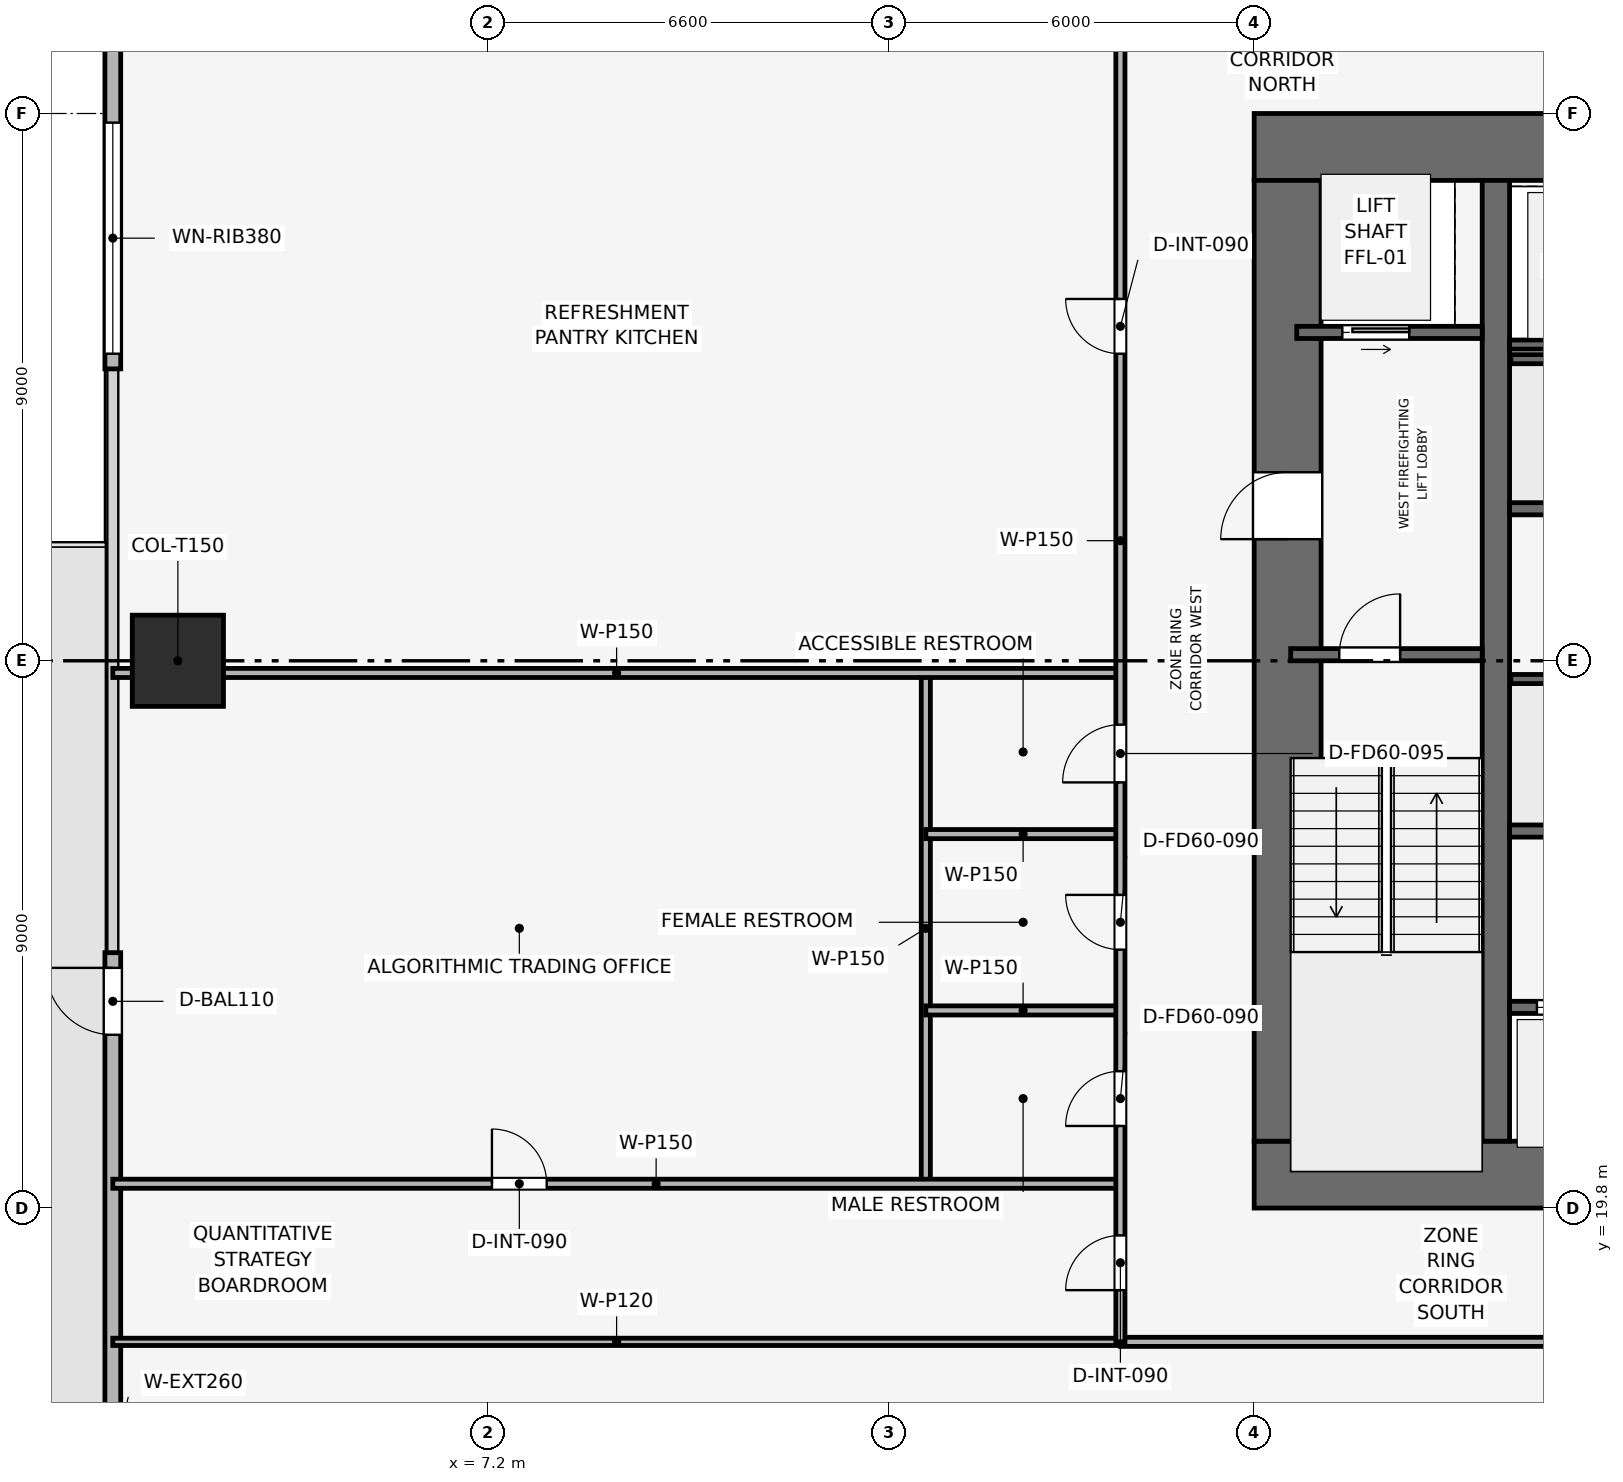
"""IFC4 building model, lengths in metres.
Left out: names, types, materials, properties, quantities, classifications, styles, units other than length and angle.
Written with IfcOpenShell. Run it as: python <this file> out.ifc"""

import sys

from ifc_helpers import new_model, si_unit, direction, frame, frame_2d, origin, origin_2d, place, context, subcontext, project, spatial, rectangle, extrude, element, fill, save


model = new_model("IFC4")
c1 = context("Model", 3, precision=1e-05, world=origin(), true_north=direction((0.0, 1.0)))
c2 = subcontext(c1, "Body", "Model", "MODEL_VIEW")
j1 = project(units=[si_unit("LENGTHUNIT", "METRE"), si_unit("PLANEANGLEUNIT", "RADIAN")], contexts=[c1])
p1 = place(None, origin())
s1 = spatial("IfcSite", under=j1, at=p1, CompositionType="ELEMENT")
p2 = place(p1, origin())
s2 = spatial("IfcBuilding", under=s1, at=p2, CompositionType="ELEMENT")
p3 = place(p2, frame((0.0, 0.0, 84.6)))
s3 = spatial("IfcBuildingStorey", under=s2, at=p3, CompositionType="ELEMENT", Elevation=84.6)
p4 = place(p3, frame((19.8, 20.35, 0.0), z_axis=(0.0, 0.0, 1.0), x_axis=(1.0, 0.0, 0.0)))
e1 = element("IfcWall", 1, at=p4, inside=s3, PredefinedType="SHEAR", context=c2, shape_type="SweptSolid", body=[
    extrude(rectangle(XDim=18.0, YDim=1.1, at=frame_2d((9.0, 0.0))), origin(), (0.0, 0.0, 1.0), 3.9),
])
p5 = place(p4, frame((8.4, 0.0, 0.0)))
e2 = element("IfcOpeningElement", 2, at=p5, cuts=e1, PredefinedType="OPENING", context=c2, shape_type="SweptSolid", body=[
    extrude(rectangle(XDim=1.2, YDim=2.2, at=frame_2d((0.6, 1.1))), frame((0.0, 0.56, 0.0), z_axis=(0.0, -1.0, 0.0), x_axis=(1.0, 0.0, 0.0)), (0.0, 0.0, 1.0), 1.12),
])
p6 = place(p3, frame((19.8, 37.25, 0.0), z_axis=(0.0, 0.0, 1.0), x_axis=(1.0, 0.0, 0.0)))
e3 = element("IfcWall", 3, at=p6, inside=s3, PredefinedType="SHEAR", context=c2, shape_type="SweptSolid", body=[
    extrude(rectangle(XDim=18.0, YDim=1.1, at=frame_2d((9.0, 0.0))), origin(), (0.0, 0.0, 1.0), 3.9),
])
p7 = place(p6, frame((7.05, 0.0, 0.0)))
e4 = element("IfcOpeningElement", 4, at=p7, cuts=e3, PredefinedType="OPENING", context=c2, shape_type="SweptSolid", body=[
    extrude(rectangle(XDim=1.1, YDim=2.15, at=frame_2d((0.55, 1.075))), frame((0.0, 0.56, 0.0), z_axis=(0.0, -1.0, 0.0), x_axis=(1.0, 0.0, 0.0)), (0.0, 0.0, 1.0), 1.12),
])
p8 = place(p3, frame((20.35, 20.9, 0.0), z_axis=(0.0, 0.0, 1.0), x_axis=(0.0, 1.0, 0.0)))
e5 = element("IfcWall", 5, at=p8, inside=s3, PredefinedType="SHEAR", context=c2, shape_type="SweptSolid", body=[
    extrude(rectangle(XDim=15.8, YDim=1.1, at=frame_2d((7.9, 0.0))), origin(), (0.0, 0.0, 1.0), 3.9),
])
p9 = place(p8, frame((9.9, 0.0, 0.0)))
e6 = element("IfcOpeningElement", 6, at=p9, cuts=e5, PredefinedType="OPENING", context=c2, shape_type="SweptSolid", body=[
    extrude(rectangle(XDim=1.1, YDim=2.15, at=frame_2d((0.55, 1.075))), frame((0.0, 0.56, 0.0), z_axis=(0.0, -1.0, 0.0), x_axis=(1.0, 0.0, 0.0)), (0.0, 0.0, 1.0), 1.12),
])
p10 = place(p3, frame((23.775, 20.9, 0.0), z_axis=(0.0, 0.0, 1.0), x_axis=(0.0, 1.0, 0.0)))
e7 = element("IfcWall", 7, at=p10, inside=s3, PredefinedType="SHEAR", context=c2, shape_type="SweptSolid", body=[
    extrude(rectangle(XDim=15.8, YDim=0.45, at=frame_2d((7.9, 0.0))), origin(), (0.0, 0.0, 1.0), 3.9),
])
p11 = place(p3, frame((2.1, 28.8, 0.003), z_axis=(0.0, 0.0, 1.0), x_axis=(1.0, 0.0, 0.0)))
e8 = element("IfcColumn", 8, at=p11, inside=s3, PredefinedType="COLUMN", context=c2, shape_type="SweptSolid", body=[
    extrude(rectangle(XDim=1.5, YDim=1.5, at=origin_2d()), origin(), (0.0, 0.0, 1.0), 3.644),
])
p12 = place(p3, frame((1.03, 8.7, 0.0), z_axis=(0.0, 0.0, 1.0), x_axis=(0.0, 1.0, 0.0)))
e9 = element("IfcWall", 9, at=p12, inside=s3, PredefinedType="SOLIDWALL", context=c2, shape_type="SweptSolid", body=[
    extrude(rectangle(XDim=15.3, YDim=0.26, at=frame_2d((7.65, 0.0))), origin(), (0.0, 0.0, 1.0), 3.65),
])
p13 = place(p12, frame((13.95, 0.0, 0.0)))
e10 = element("IfcOpeningElement", 10, at=p13, cuts=e9, PredefinedType="OPENING", context=c2, shape_type="SweptSolid", body=[
    extrude(rectangle(XDim=1.1, YDim=2.2, at=frame_2d((0.55, 1.1))), frame((0.0, 0.14, 0.0), z_axis=(0.0, -1.0, 0.0), x_axis=(1.0, 0.0, 0.0)), (0.0, 0.0, 1.0), 0.28),
])
p14 = place(p3, frame((1.03, 33.6, 0.0), z_axis=(0.0, 0.0, 1.0), x_axis=(0.0, 1.0, 0.0)))
e11 = element("IfcWall", 11, at=p14, inside=s3, PredefinedType="SOLIDWALL", context=c2, shape_type="SweptSolid", body=[
    extrude(rectangle(XDim=15.3, YDim=0.26, at=frame_2d((7.65, 0.0))), origin(), (0.0, 0.0, 1.0), 3.65),
])
p15 = place(p14, frame((0.25, 0.0, 0.9)))
e12 = element("IfcOpeningElement", 12, at=p15, cuts=e11, PredefinedType="OPENING", context=c2, shape_type="SweptSolid", body=[
    extrude(rectangle(XDim=3.8, YDim=1.9, at=frame_2d((1.9, 0.95))), frame((0.0, 0.14, 0.0), z_axis=(0.0, -1.0, 0.0), x_axis=(1.0, 0.0, 0.0)), (0.0, 0.0, 1.0), 0.28),
])
p16 = place(p3, frame((20.4, 28.9, 0.0), z_axis=(0.0, 0.0, 1.0), x_axis=(1.0, 0.0, 0.0)))
e13 = element("IfcWall", 13, at=p16, inside=s3, PredefinedType="SHEAR", context=c2, shape_type="SweptSolid", body=[
    extrude(rectangle(XDim=3.15, YDim=0.2, at=frame_2d((1.575, 0.0))), origin(), (0.0, 0.0, 1.0), 3.65),
])
p17 = place(p16, frame((0.8, 0.0, 0.0)))
e14 = element("IfcOpeningElement", 14, at=p17, cuts=e13, PredefinedType="OPENING", context=c2, shape_type="SweptSolid", body=[
    extrude(rectangle(XDim=1.0, YDim=2.1, at=frame_2d((0.5, 1.05))), frame((0.0, 0.11, 0.0), z_axis=(0.0, -1.0, 0.0), x_axis=(1.0, 0.0, 0.0)), (0.0, 0.0, 1.0), 0.22),
])
p18 = place(p3, frame((20.5, 34.2, 0.0), z_axis=(0.0, 0.0, 1.0), x_axis=(1.0, 0.0, 0.0)))
e15 = element("IfcWall", 15, at=p18, inside=s3, PredefinedType="SHEAR", context=c2, shape_type="SweptSolid", body=[
    extrude(rectangle(XDim=3.05, YDim=0.2, at=frame_2d((1.525, 0.0))), origin(), (0.0, 0.0, 1.0), 3.65),
])
p19 = place(p18, frame((0.75, 0.0, 0.0)))
e16 = element("IfcOpeningElement", 16, at=p19, cuts=e15, PredefinedType="OPENING", context=c2, shape_type="SweptSolid", body=[
    extrude(rectangle(XDim=1.1, YDim=2.15, at=frame_2d((0.55, 1.075))), frame((0.0, 0.11, 0.0), z_axis=(0.0, -1.0, 0.0), x_axis=(1.0, 0.0, 0.0)), (0.0, 0.0, 1.0), 0.22),
])
p20 = place(p3, frame((24.0, 34.0, 0.0), z_axis=(0.0, 0.0, 1.0), x_axis=(1.0, 0.0, 0.0)))
e17 = element("IfcWall", 17, at=p20, inside=s3, PredefinedType="SHEAR", context=c2, shape_type="SweptSolid", body=[
    extrude(rectangle(XDim=2.48, YDim=0.15, at=frame_2d((1.24, 0.0))), origin(), (0.0, 0.0, 1.0), 3.65),
])
p21 = place(p3, frame((24.0, 23.1, 0.0), z_axis=(0.0, 0.0, 1.0), x_axis=(1.0, 0.0, 0.0)))
e18 = element("IfcWall", 18, at=p21, inside=s3, PredefinedType="SHEAR", context=c2, shape_type="SweptSolid", body=[
    extrude(rectangle(XDim=2.0, YDim=0.2, at=frame_2d((1.0, 0.0))), origin(), (0.0, 0.0, 1.0), 3.65),
])
p22 = place(p21, frame((0.45, 0.0, 0.0)))
e19 = element("IfcOpeningElement", 19, at=p22, cuts=e18, PredefinedType="OPENING", context=c2, shape_type="SweptSolid", body=[
    extrude(rectangle(XDim=1.1, YDim=2.15, at=frame_2d((0.55, 1.075))), frame((0.0, 0.11, 0.0), z_axis=(0.0, -1.0, 0.0), x_axis=(1.0, 0.0, 0.0)), (0.0, 0.0, 1.0), 0.22),
])
for number, where, z_axis, x_axis in (
    (20, (24.0, 26.0, 0.0), (0.0, 0.0, 1.0), (1.0, 0.0, 0.0)),
    (21, (24.0, 31.3, 0.0), (0.0, 0.0, 1.0), (1.0, 0.0, 0.0)),
):
    element("IfcWall", number, at=place(p3, frame(where, z_axis=z_axis, x_axis=x_axis)), inside=s3, PredefinedType="SHEAR", context=c2, shape_type="SweptSolid", body=[
        extrude(rectangle(XDim=2.0, YDim=0.2, at=frame_2d((1.0, 0.0))), origin(), (0.0, 0.0, 1.0), 3.65),
    ])
for number, where, z_axis, x_axis in (
    (22, (24.02, 28.5, 0.0), (0.0, 0.0, 1.0), (1.0, 0.0, 0.0)),
    (23, (24.02, 33.76, 0.0), (0.0, 0.0, 1.0), (1.0, 0.0, 0.0)),
):
    element("IfcWall", number, at=place(p3, frame(where, z_axis=z_axis, x_axis=x_axis)), inside=s3, PredefinedType="SHEAR", context=c2, shape_type="SweptSolid", body=[
        extrude(rectangle(XDim=4.08, YDim=0.15, at=frame_2d((2.04, 0.0))), origin(), (0.0, 0.0, 1.0), 3.65),
    ])
p23 = place(p3, frame((1.03, 17.6, 0.0), z_axis=(0.0, 0.0, 1.0), x_axis=(1.0, 0.0, 0.0)))
e24 = element("IfcWall", 24, at=p23, inside=s3, PredefinedType="PARTITIONING", context=c2, shape_type="SweptSolid", body=[
    extrude(rectangle(XDim=16.57, YDim=0.12, at=frame_2d((8.285, 0.0))), origin(), (0.0, 0.0, 1.0), 2.935),
])
p24 = place(p3, frame((14.4, 20.2, 0.0), z_axis=(0.0, 0.0, 1.0), x_axis=(0.0, 1.0, 0.0)))
e25 = element("IfcWall", 25, at=p24, inside=s3, PredefinedType="PARTITIONING", context=c2, shape_type="SweptSolid", body=[
    extrude(rectangle(XDim=8.4, YDim=0.15, at=frame_2d((4.2, 0.0))), origin(), (0.0, 0.0, 1.0), 3.085),
])
p25 = place(p3, frame((1.03, 20.2, 0.0), z_axis=(0.0, 0.0, 1.0), x_axis=(1.0, 0.0, 0.0)))
e26 = element("IfcWall", 26, at=p25, inside=s3, PredefinedType="PARTITIONING", context=c2, shape_type="SweptSolid", body=[
    extrude(rectangle(XDim=16.57, YDim=0.15, at=frame_2d((8.285, 0.0))), origin(), (0.0, 0.0, 1.0), 2.935),
])
p26 = place(p25, frame((6.235, 0.0, 0.0)))
e27 = element("IfcOpeningElement", 27, at=p26, cuts=e26, PredefinedType="OPENING", context=c2, shape_type="SweptSolid", body=[
    extrude(rectangle(XDim=0.9, YDim=2.1, at=frame_2d((0.45, 1.05))), frame((0.0, 0.085, 0.0), z_axis=(0.0, -1.0, 0.0), x_axis=(1.0, 0.0, 0.0)), (0.0, 0.0, 1.0), 0.17),
])
p27 = place(p3, frame((1.03, 28.6, 0.0), z_axis=(0.0, 0.0, 1.0), x_axis=(1.0, 0.0, 0.0)))
e28 = element("IfcWall", 28, at=p27, inside=s3, PredefinedType="PARTITIONING", context=c2, shape_type="SweptSolid", body=[
    extrude(rectangle(XDim=16.57, YDim=0.15, at=frame_2d((8.285, 0.0))), origin(), (0.0, 0.0, 1.0), 2.935),
])
for number, where, z_axis, x_axis in (
    (29, (14.4, 23.05, 0.0), (0.0, 0.0, 1.0), (1.0, 0.0, 0.0)),
    (30, (14.4, 25.95, 0.0), (0.0, 0.0, 1.0), (1.0, 0.0, 0.0)),
):
    element("IfcWall", number, at=place(p3, frame(where, z_axis=z_axis, x_axis=x_axis)), inside=s3, PredefinedType="PARTITIONING", context=c2, shape_type="SweptSolid", body=[
        extrude(rectangle(XDim=3.2, YDim=0.15, at=frame_2d((1.6, 0.0))), origin(), (0.0, 0.0, 1.0), 3.65),
    ])
p28 = place(p3, frame((17.6, 17.6, 0.0), z_axis=(0.0, 0.0, 1.0), x_axis=(1.0, 0.0, 0.0)))
e31 = element("IfcWall", 31, at=p28, inside=s3, PredefinedType="PARTITIONING", context=c2, shape_type="SweptSolid", body=[
    extrude(rectangle(XDim=22.4, YDim=0.15, at=frame_2d((11.2, 0.0))), origin(), (0.0, 0.0, 1.0), 3.085),
])
p29 = place(p28, frame((10.75, 0.0, 0.0)))
e32 = element("IfcOpeningElement", 32, at=p29, cuts=e31, PredefinedType="OPENING", context=c2, shape_type="SweptSolid", body=[
    extrude(rectangle(XDim=0.9, YDim=2.1, at=frame_2d((0.45, 1.05))), frame((0.0, 0.085, 0.0), z_axis=(0.0, -1.0, 0.0), x_axis=(1.0, 0.0, 0.0)), (0.0, 0.0, 1.0), 0.17),
])
p30 = place(p3, frame((17.6, 17.6, 0.0), z_axis=(0.0, 0.0, 1.0), x_axis=(0.0, 1.0, 0.0)))
e33 = element("IfcWall", 33, at=p30, inside=s3, PredefinedType="PARTITIONING", context=c2, shape_type="SweptSolid", body=[
    extrude(rectangle(XDim=22.4, YDim=0.15, at=frame_2d((11.2, 0.0))), origin(), (0.0, 0.0, 1.0), 3.085),
])
p31 = place(p30, frame((0.85, 0.0, 0.0)))
e34 = element("IfcOpeningElement", 34, at=p31, cuts=e33, PredefinedType="OPENING", context=c2, shape_type="SweptSolid", body=[
    extrude(rectangle(XDim=0.9, YDim=2.1, at=frame_2d((0.45, 1.05))), frame((0.0, 0.085, 0.0), z_axis=(0.0, -1.0, 0.0), x_axis=(1.0, 0.0, 0.0)), (0.0, 0.0, 1.0), 0.17),
])
p32 = place(p30, frame((3.55, 0.0, 0.0)))
e35 = element("IfcOpeningElement", 35, at=p32, cuts=e33, PredefinedType="OPENING", context=c2, shape_type="SweptSolid", body=[
    extrude(rectangle(XDim=0.9, YDim=2.1, at=frame_2d((0.45, 1.05))), frame((0.0, 0.085, 0.0), z_axis=(0.0, -1.0, 0.0), x_axis=(1.0, 0.0, 0.0)), (0.0, 0.0, 1.0), 0.17),
])
p33 = place(p30, frame((6.45, 0.0, 0.0)))
e36 = element("IfcOpeningElement", 36, at=p33, cuts=e33, PredefinedType="OPENING", context=c2, shape_type="SweptSolid", body=[
    extrude(rectangle(XDim=0.9, YDim=2.1, at=frame_2d((0.45, 1.05))), frame((0.0, 0.085, 0.0), z_axis=(0.0, -1.0, 0.0), x_axis=(1.0, 0.0, 0.0)), (0.0, 0.0, 1.0), 0.17),
])
p34 = place(p30, frame((9.2, 0.0, 0.0)))
e37 = element("IfcOpeningElement", 37, at=p34, cuts=e33, PredefinedType="OPENING", context=c2, shape_type="SweptSolid", body=[
    extrude(rectangle(XDim=0.95, YDim=2.1, at=frame_2d((0.475, 1.05))), frame((0.0, 0.085, 0.0), z_axis=(0.0, -1.0, 0.0), x_axis=(1.0, 0.0, 0.0)), (0.0, 0.0, 1.0), 0.17),
])
p35 = place(p30, frame((16.25, 0.0, 0.0)))
e38 = element("IfcOpeningElement", 38, at=p35, cuts=e33, PredefinedType="OPENING", context=c2, shape_type="SweptSolid", body=[
    extrude(rectangle(XDim=0.9, YDim=2.1, at=frame_2d((0.45, 1.05))), frame((0.0, 0.085, 0.0), z_axis=(0.0, -1.0, 0.0), x_axis=(1.0, 0.0, 0.0)), (0.0, 0.0, 1.0), 0.17),
])
p36 = place(p13, origin())
e39 = element("IfcDoor", 39, at=p36, inside=s3, OperationType="SINGLE_SWING_RIGHT", PredefinedType="DOOR", context=c2, shape_type="SweptSolid", body=[
    extrude(rectangle(XDim=1.1, YDim=2.2, at=frame_2d((0.55, 1.1))), frame((0.0, 0.025, 0.0), z_axis=(0.0, -1.0, 0.0), x_axis=(1.0, 0.0, 0.0)), (0.0, 0.0, 1.0), 0.05),
])
fill(e10, e39)
p37 = place(p15, origin())
e40 = element("IfcWindow", 40, at=p37, inside=s3, PartitioningType="SINGLE_PANEL", PredefinedType="WINDOW", context=c2, shape_type="SweptSolid", body=[
    extrude(rectangle(XDim=3.8, YDim=1.9, at=frame_2d((1.9, 0.95))), frame((0.0, 0.03, 0.0), z_axis=(0.0, -1.0, 0.0), x_axis=(1.0, 0.0, 0.0)), (0.0, 0.0, 1.0), 0.06),
])
fill(e12, e40)
p38 = place(p17, origin())
e41 = element("IfcDoor", 41, at=p38, inside=s3, OperationType="SINGLE_SWING_RIGHT", PredefinedType="DOOR", context=c2, shape_type="SweptSolid", body=[
    extrude(rectangle(XDim=1.0, YDim=2.1, at=frame_2d((0.5, 1.05))), frame((0.0, 0.025, 0.0), z_axis=(0.0, -1.0, 0.0), x_axis=(1.0, 0.0, 0.0)), (0.0, 0.0, 1.0), 0.05),
])
fill(e14, e41)
p39 = place(p19, origin())
e42 = element("IfcDoor", 42, at=p39, inside=s3, OperationType="SLIDING_TO_RIGHT", PredefinedType="DOOR", context=c2, shape_type="SweptSolid", body=[
    extrude(rectangle(XDim=1.1, YDim=2.15, at=frame_2d((0.55, 1.075))), frame((0.0, 0.025, 0.0), z_axis=(0.0, -1.0, 0.0), x_axis=(1.0, 0.0, 0.0)), (0.0, 0.0, 1.0), 0.05),
])
fill(e16, e42)
p40 = place(p22, origin())
e43 = element("IfcDoor", 43, at=p40, inside=s3, OperationType="SLIDING_TO_RIGHT", PredefinedType="DOOR", context=c2, shape_type="SweptSolid", body=[
    extrude(rectangle(XDim=1.1, YDim=2.15, at=frame_2d((0.55, 1.075))), frame((0.0, 0.025, 0.0), z_axis=(0.0, -1.0, 0.0), x_axis=(1.0, 0.0, 0.0)), (0.0, 0.0, 1.0), 0.05),
])
fill(e19, e43)
p41 = place(p26, origin())
e44 = element("IfcDoor", 44, at=p41, inside=s3, OperationType="SINGLE_SWING_LEFT", PredefinedType="DOOR", context=c2, shape_type="SweptSolid", body=[
    extrude(rectangle(XDim=0.9, YDim=2.1, at=frame_2d((0.45, 1.05))), frame((0.0, 0.025, 0.0), z_axis=(0.0, -1.0, 0.0), x_axis=(1.0, 0.0, 0.0)), (0.0, 0.0, 1.0), 0.05),
])
fill(e27, e44)
p42 = place(p31, origin())
e45 = element("IfcDoor", 45, at=p42, inside=s3, OperationType="SINGLE_SWING_LEFT", PredefinedType="DOOR", context=c2, shape_type="SweptSolid", body=[
    extrude(rectangle(XDim=0.9, YDim=2.1, at=frame_2d((0.45, 1.05))), frame((0.0, 0.025, 0.0), z_axis=(0.0, -1.0, 0.0), x_axis=(1.0, 0.0, 0.0)), (0.0, 0.0, 1.0), 0.05),
])
fill(e34, e45)
p43 = place(p32, origin())
e46 = element("IfcDoor", 46, at=p43, inside=s3, OperationType="SINGLE_SWING_LEFT", PredefinedType="DOOR", context=c2, shape_type="SweptSolid", body=[
    extrude(rectangle(XDim=0.9, YDim=2.1, at=frame_2d((0.45, 1.05))), frame((0.0, 0.025, 0.0), z_axis=(0.0, -1.0, 0.0), x_axis=(1.0, 0.0, 0.0)), (0.0, 0.0, 1.0), 0.05),
])
fill(e35, e46)
p44 = place(p33, origin())
e47 = element("IfcDoor", 47, at=p44, inside=s3, OperationType="SINGLE_SWING_RIGHT", PredefinedType="DOOR", context=c2, shape_type="SweptSolid", body=[
    extrude(rectangle(XDim=0.9, YDim=2.1, at=frame_2d((0.45, 1.05))), frame((0.0, 0.025, 0.0), z_axis=(0.0, -1.0, 0.0), x_axis=(1.0, 0.0, 0.0)), (0.0, 0.0, 1.0), 0.05),
])
fill(e36, e47)
p45 = place(p34, origin())
e48 = element("IfcDoor", 48, at=p45, inside=s3, OperationType="SINGLE_SWING_LEFT", PredefinedType="DOOR", context=c2, shape_type="SweptSolid", body=[
    extrude(rectangle(XDim=0.95, YDim=2.1, at=frame_2d((0.475, 1.05))), frame((0.0, 0.025, 0.0), z_axis=(0.0, -1.0, 0.0), x_axis=(1.0, 0.0, 0.0)), (0.0, 0.0, 1.0), 0.05),
])
fill(e37, e48)
p46 = place(p35, origin())
e49 = element("IfcDoor", 49, at=p46, inside=s3, OperationType="SINGLE_SWING_RIGHT", PredefinedType="DOOR", context=c2, shape_type="SweptSolid", body=[
    extrude(rectangle(XDim=0.9, YDim=2.1, at=frame_2d((0.45, 1.05))), frame((0.0, 0.025, 0.0), z_axis=(0.0, -1.0, 0.0), x_axis=(1.0, 0.0, 0.0)), (0.0, 0.0, 1.0), 0.05),
])
fill(e38, e49)
p47 = place(p9, origin())
e50 = element("IfcDoor", 50, at=p47, inside=s3, OperationType="SINGLE_SWING_LEFT", PredefinedType="DOOR", context=c2, shape_type="SweptSolid", body=[
    extrude(rectangle(XDim=1.1, YDim=2.15, at=frame_2d((0.55, 1.075))), frame((0.0, 0.025, 0.0), z_axis=(0.0, -1.0, 0.0), x_axis=(1.0, 0.0, 0.0)), (0.0, 0.0, 1.0), 0.05),
])
fill(e6, e50)
save(model, sys.argv[1])
